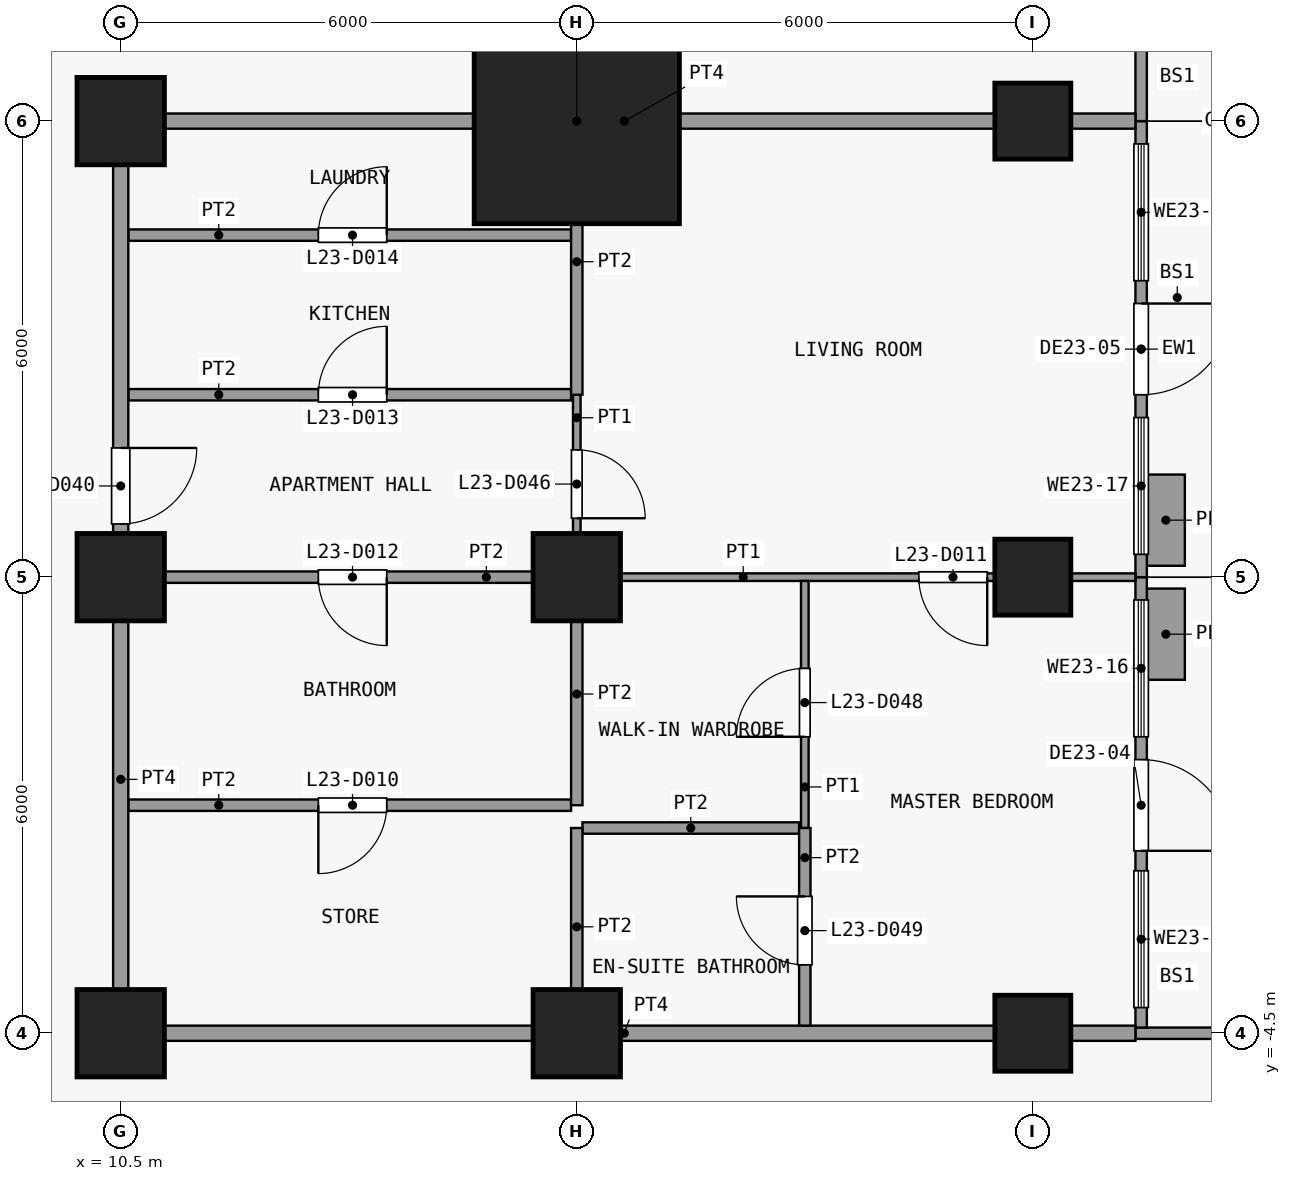
"""IFC4 building model, lengths in metres.
Left out: names, types, materials, properties, quantities, classifications, styles, units other than length and angle.
Written with IfcOpenShell. Run it as: python <this file> out.ifc"""

import sys

from ifc_helpers import new_model, si_unit, direction, frame, frame_2d, origin, origin_2d, place, context, subcontext, project, spatial, rectangle, extrude, element, fill, save


model = new_model("IFC4")
c1 = context("Model", 3, precision=1e-05, world=origin(), true_north=direction((0.0, 1.0)))
c2 = subcontext(c1, "Body", "Model", "MODEL_VIEW")
j1 = project(units=[si_unit("LENGTHUNIT", "METRE"), si_unit("PLANEANGLEUNIT", "RADIAN")], contexts=[c1])
p1 = place(None, origin())
s1 = spatial("IfcSite", under=j1, at=p1, CompositionType="ELEMENT")
p2 = place(p1, origin())
s2 = spatial("IfcBuilding", under=s1, at=p2, CompositionType="ELEMENT")
p3 = place(p2, frame((0.0, 0.0, 95.5)))
s3 = spatial("IfcBuildingStorey", under=s2, at=p3, CompositionType="ELEMENT", Elevation=95.5)
for number, where, z_axis, x_axis in (
    (1, (10.5, -4.5, 0.0), (0.0, 0.0, 1.0), (1.0, 0.0, 0.0)),
    (2, (10.5, 1.5, 0.0), (0.0, 0.0, 1.0), (1.0, 0.0, 0.0)),
    (3, (10.5, 7.5, 0.0), (0.0, 0.0, 1.0), (1.0, 0.0, 0.0)),
    (4, (16.5, -4.5, 0.0), (0.0, 0.0, 1.0), (1.0, 0.0, 0.0)),
    (5, (16.5, 1.5, 0.0), (0.0, 0.0, 1.0), (1.0, 0.0, 0.0)),
):
    element("IfcColumn", number, at=place(p3, frame(where, z_axis=z_axis, x_axis=x_axis)), inside=s3, PredefinedType="COLUMN", context=c2, shape_type="SweptSolid", body=[
        extrude(rectangle(XDim=1.15, YDim=1.15, at=origin_2d()), origin(), (0.0, 0.0, 1.0), 3.6),
    ])
p4 = place(p3, frame((16.5, 7.5, 0.0), z_axis=(0.0, 0.0, 1.0), x_axis=(1.0, 0.0, 0.0)))
e6 = element("IfcColumn", 6, at=p4, inside=s3, PredefinedType="COLUMN", context=c2, shape_type="SweptSolid", body=[
    extrude(rectangle(XDim=2.7, YDim=2.7, at=origin_2d()), origin(), (0.0, 0.0, 1.0), 3.6),
])
for number, where, z_axis, x_axis in (
    (7, (22.5, -4.5, 0.0), (0.0, 0.0, 1.0), (1.0, 0.0, 0.0)),
    (8, (22.5, 1.5, 0.0), (0.0, 0.0, 1.0), (1.0, 0.0, 0.0)),
    (9, (22.5, 7.5, 0.0), (0.0, 0.0, 1.0), (1.0, 0.0, 0.0)),
):
    element("IfcColumn", number, at=place(p3, frame(where, z_axis=z_axis, x_axis=x_axis)), inside=s3, PredefinedType="COLUMN", context=c2, shape_type="SweptSolid", body=[
        extrude(rectangle(XDim=1.0, YDim=1.0, at=origin_2d()), origin(), (0.0, 0.0, 1.0), 3.6),
    ])
p5 = place(p3, frame((23.85, -4.5, 0.0), z_axis=(0.0, 0.0, 1.0), x_axis=(1.0, 0.0, 0.0)))
e10 = element("IfcWall", 10, at=p5, inside=s3, PredefinedType="SOLIDWALL", context=c2, shape_type="SweptSolid", body=[
    extrude(rectangle(XDim=2.55, YDim=0.15, at=frame_2d((1.275, 0.0))), origin(), (0.0, 0.0, 1.0), 3.3),
])
p6 = place(p3, frame((23.925, 1.5, 0.0), z_axis=(0.0, 0.0, 1.0), x_axis=(0.0, -1.0, 0.0)))
e11 = element("IfcWall", 11, at=p6, inside=s3, PredefinedType="SOLIDWALL", context=c2, shape_type="SweptSolid", body=[
    extrude(rectangle(XDim=5.925, YDim=0.15, at=frame_2d((2.962, 0.0))), origin(), (0.0, 0.0, 1.0), 3.3),
])
p7 = place(p6, frame((2.4, 0.0, 0.0)))
e12 = element("IfcOpeningElement", 12, at=p7, cuts=e11, PredefinedType="OPENING", context=c2, shape_type="SweptSolid", body=[
    extrude(rectangle(XDim=1.2, YDim=2.4, at=frame_2d((0.6, 1.2))), frame((0.0, 0.085, 0.0), z_axis=(0.0, -1.0, 0.0), x_axis=(1.0, 0.0, 0.0)), (0.0, 0.0, 1.0), 0.17),
])
p8 = place(p6, frame((3.863, 0.0, 0.9)))
e13 = element("IfcOpeningElement", 13, at=p8, cuts=e11, PredefinedType="OPENING", context=c2, shape_type="SweptSolid", body=[
    extrude(rectangle(XDim=1.8, YDim=2.1, at=frame_2d((0.9, 1.05))), frame((0.0, 0.085, 0.0), z_axis=(0.0, -1.0, 0.0), x_axis=(1.0, 0.0, 0.0)), (0.0, 0.0, 1.0), 0.17),
])
p9 = place(p6, frame((0.3, 0.0, 0.9)))
e14 = element("IfcOpeningElement", 14, at=p9, cuts=e11, PredefinedType="OPENING", context=c2, shape_type="SweptSolid", body=[
    extrude(rectangle(XDim=1.8, YDim=2.1, at=frame_2d((0.9, 1.05))), frame((0.0, 0.085, 0.0), z_axis=(0.0, -1.0, 0.0), x_axis=(1.0, 0.0, 0.0)), (0.0, 0.0, 1.0), 0.17),
])
p10 = place(p3, frame((24.25, 0.15, 0.0), z_axis=(0.0, 0.0, 1.0), x_axis=(0.0, 1.0, 0.0)))
e15 = element("IfcWall", 15, at=p10, inside=s3, PredefinedType="USERDEFINED", context=c2, shape_type="SweptSolid", body=[
    extrude(rectangle(XDim=1.2, YDim=0.5, at=frame_2d((0.6, 0.0))), origin(), (0.0, 0.0, 1.0), 0.9),
])
p11 = place(p3, frame((23.925, 7.5, 0.0), z_axis=(0.0, 0.0, 1.0), x_axis=(0.0, -1.0, 0.0)))
e16 = element("IfcWall", 16, at=p11, inside=s3, PredefinedType="SOLIDWALL", context=c2, shape_type="SweptSolid", body=[
    extrude(rectangle(XDim=6.0, YDim=0.15, at=frame_2d((3.0, 0.0))), origin(), (0.0, 0.0, 1.0), 3.3),
])
p12 = place(p11, frame((2.4, 0.0, 0.0)))
e17 = element("IfcOpeningElement", 17, at=p12, cuts=e16, PredefinedType="OPENING", context=c2, shape_type="SweptSolid", body=[
    extrude(rectangle(XDim=1.2, YDim=2.4, at=frame_2d((0.6, 1.2))), frame((0.0, 0.085, 0.0), z_axis=(0.0, -1.0, 0.0), x_axis=(1.0, 0.0, 0.0)), (0.0, 0.0, 1.0), 0.17),
])
p13 = place(p11, frame((3.9, 0.0, 0.9)))
e18 = element("IfcOpeningElement", 18, at=p13, cuts=e16, PredefinedType="OPENING", context=c2, shape_type="SweptSolid", body=[
    extrude(rectangle(XDim=1.8, YDim=2.1, at=frame_2d((0.9, 1.05))), frame((0.0, 0.085, 0.0), z_axis=(0.0, -1.0, 0.0), x_axis=(1.0, 0.0, 0.0)), (0.0, 0.0, 1.0), 0.17),
])
p14 = place(p11, frame((0.3, 0.0, 0.9)))
e19 = element("IfcOpeningElement", 19, at=p14, cuts=e16, PredefinedType="OPENING", context=c2, shape_type="SweptSolid", body=[
    extrude(rectangle(XDim=1.8, YDim=2.1, at=frame_2d((0.9, 1.05))), frame((0.0, 0.085, 0.0), z_axis=(0.0, -1.0, 0.0), x_axis=(1.0, 0.0, 0.0)), (0.0, 0.0, 1.0), 0.17),
])
p15 = place(p3, frame((24.25, 1.65, 0.0), z_axis=(0.0, 0.0, 1.0), x_axis=(0.0, 1.0, 0.0)))
e20 = element("IfcWall", 20, at=p15, inside=s3, PredefinedType="USERDEFINED", context=c2, shape_type="SweptSolid", body=[
    extrude(rectangle(XDim=1.2, YDim=0.5, at=frame_2d((0.6, 0.0))), origin(), (0.0, 0.0, 1.0), 0.9),
])
p16 = place(p3, frame((23.925, 13.425, 0.0), z_axis=(0.0, 0.0, 1.0), x_axis=(0.0, -1.0, 0.0)))
e21 = element("IfcWall", 21, at=p16, inside=s3, PredefinedType="SOLIDWALL", context=c2, shape_type="SweptSolid", body=[
    extrude(rectangle(XDim=5.925, YDim=0.15, at=frame_2d((2.962, 0.0))), origin(), (0.0, 0.0, 1.0), 3.3),
])
p17 = place(p16, frame((0.825, 0.0, 0.0)))
e22 = element("IfcOpeningElement", 22, at=p17, cuts=e21, PredefinedType="OPENING", context=c2, shape_type="SweptSolid", body=[
    extrude(rectangle(XDim=1.2, YDim=2.4, at=frame_2d((0.6, 1.2))), frame((0.0, 0.085, 0.0), z_axis=(0.0, -1.0, 0.0), x_axis=(1.0, 0.0, 0.0)), (0.0, 0.0, 1.0), 0.17),
])
p18 = place(p16, frame((3.075, 0.0, 0.9)))
e23 = element("IfcOpeningElement", 23, at=p18, cuts=e21, PredefinedType="OPENING", context=c2, shape_type="SweptSolid", body=[
    extrude(rectangle(XDim=1.8, YDim=2.1, at=frame_2d((0.9, 1.05))), frame((0.0, 0.085, 0.0), z_axis=(0.0, -1.0, 0.0), x_axis=(1.0, 0.0, 0.0)), (0.0, 0.0, 1.0), 0.17),
])
p19 = place(p3, frame((10.4, -4.5, 0.0), z_axis=(0.0, 0.0, 1.0), x_axis=(1.0, 0.0, 0.0)))
e24 = element("IfcWall", 24, at=p19, inside=s3, PredefinedType="PARTITIONING", context=c2, shape_type="SweptSolid", body=[
    extrude(rectangle(XDim=13.45, YDim=0.2, at=frame_2d((6.725, 0.0))), origin(), (0.0, 0.0, 1.0), 3.3),
])
p20 = place(p3, frame((16.575, -1.8, 0.0), z_axis=(0.0, 0.0, 1.0), x_axis=(1.0, 0.0, 0.0)))
e25 = element("IfcWall", 25, at=p20, inside=s3, PredefinedType="PARTITIONING", context=c2, shape_type="SweptSolid", body=[
    extrude(rectangle(XDim=2.85, YDim=0.15, at=frame_2d((1.425, 0.0))), origin(), (0.0, 0.0, 1.0), 3.3),
])
p21 = place(p3, frame((10.6, -1.5, 0.0), z_axis=(0.0, 0.0, 1.0), x_axis=(1.0, 0.0, 0.0)))
e26 = element("IfcWall", 26, at=p21, inside=s3, PredefinedType="PARTITIONING", context=c2, shape_type="SweptSolid", body=[
    extrude(rectangle(XDim=5.825, YDim=0.15, at=frame_2d((2.913, 0.0))), origin(), (0.0, 0.0, 1.0), 3.3),
])
p22 = place(p21, frame((2.5, 0.0, 0.0)))
e27 = element("IfcOpeningElement", 27, at=p22, cuts=e26, PredefinedType="OPENING", context=c2, shape_type="SweptSolid", body=[
    extrude(rectangle(XDim=0.9, YDim=2.1, at=frame_2d((0.45, 1.05))), frame((0.0, 0.085, 0.0), z_axis=(0.0, -1.0, 0.0), x_axis=(1.0, 0.0, 0.0)), (0.0, 0.0, 1.0), 0.17),
])
p23 = place(p3, frame((16.5, 1.5, 0.0), z_axis=(0.0, 0.0, 1.0), x_axis=(1.0, 0.0, 0.0)))
e28 = element("IfcWall", 28, at=p23, inside=s3, PredefinedType="PARTITIONING", context=c2, shape_type="SweptSolid", body=[
    extrude(rectangle(XDim=7.35, YDim=0.1, at=frame_2d((3.675, 0.0))), origin(), (0.0, 0.0, 1.0), 3.3),
])
p24 = place(p23, frame((4.5, 0.0, 0.0)))
e29 = element("IfcOpeningElement", 29, at=p24, cuts=e28, PredefinedType="OPENING", context=c2, shape_type="SweptSolid", body=[
    extrude(rectangle(XDim=0.9, YDim=2.1, at=frame_2d((0.45, 1.05))), frame((0.0, 0.06, 0.0), z_axis=(0.0, -1.0, 0.0), x_axis=(1.0, 0.0, 0.0)), (0.0, 0.0, 1.0), 0.12),
])
p25 = place(p3, frame((10.6, 1.5, 0.0), z_axis=(0.0, 0.0, 1.0), x_axis=(1.0, 0.0, 0.0)))
e30 = element("IfcWall", 30, at=p25, inside=s3, PredefinedType="PARTITIONING", context=c2, shape_type="SweptSolid", body=[
    extrude(rectangle(XDim=5.9, YDim=0.15, at=frame_2d((2.95, 0.0))), origin(), (0.0, 0.0, 1.0), 3.3),
])
p26 = place(p25, frame((2.5, 0.0, 0.0)))
e31 = element("IfcOpeningElement", 31, at=p26, cuts=e30, PredefinedType="OPENING", context=c2, shape_type="SweptSolid", body=[
    extrude(rectangle(XDim=0.9, YDim=2.1, at=frame_2d((0.45, 1.05))), frame((0.0, 0.085, 0.0), z_axis=(0.0, -1.0, 0.0), x_axis=(1.0, 0.0, 0.0)), (0.0, 0.0, 1.0), 0.17),
])
p27 = place(p3, frame((10.6, 3.9, 0.0), z_axis=(0.0, 0.0, 1.0), x_axis=(1.0, 0.0, 0.0)))
e32 = element("IfcWall", 32, at=p27, inside=s3, PredefinedType="PARTITIONING", context=c2, shape_type="SweptSolid", body=[
    extrude(rectangle(XDim=5.825, YDim=0.15, at=frame_2d((2.913, 0.0))), origin(), (0.0, 0.0, 1.0), 3.3),
])
p28 = place(p27, frame((2.5, 0.0, 0.0)))
e33 = element("IfcOpeningElement", 33, at=p28, cuts=e32, PredefinedType="OPENING", context=c2, shape_type="SweptSolid", body=[
    extrude(rectangle(XDim=0.9, YDim=2.1, at=frame_2d((0.45, 1.05))), frame((0.0, 0.085, 0.0), z_axis=(0.0, -1.0, 0.0), x_axis=(1.0, 0.0, 0.0)), (0.0, 0.0, 1.0), 0.17),
])
p29 = place(p3, frame((10.6, 6.0, 0.0), z_axis=(0.0, 0.0, 1.0), x_axis=(1.0, 0.0, 0.0)))
e34 = element("IfcWall", 34, at=p29, inside=s3, PredefinedType="PARTITIONING", context=c2, shape_type="SweptSolid", body=[
    extrude(rectangle(XDim=5.825, YDim=0.15, at=frame_2d((2.913, 0.0))), origin(), (0.0, 0.0, 1.0), 3.3),
])
p30 = place(p29, frame((2.5, 0.0, 0.0)))
e35 = element("IfcOpeningElement", 35, at=p30, cuts=e34, PredefinedType="OPENING", context=c2, shape_type="SweptSolid", body=[
    extrude(rectangle(XDim=0.9, YDim=2.1, at=frame_2d((0.45, 1.05))), frame((0.0, 0.085, 0.0), z_axis=(0.0, -1.0, 0.0), x_axis=(1.0, 0.0, 0.0)), (0.0, 0.0, 1.0), 0.17),
])
p31 = place(p3, frame((10.4, 7.5, 0.0), z_axis=(0.0, 0.0, 1.0), x_axis=(1.0, 0.0, 0.0)))
e36 = element("IfcWall", 36, at=p31, inside=s3, PredefinedType="PARTITIONING", context=c2, shape_type="SweptSolid", body=[
    extrude(rectangle(XDim=13.45, YDim=0.2, at=frame_2d((6.725, 0.0))), origin(), (0.0, 0.0, 1.0), 3.3),
])
p32 = place(p3, frame((10.5, -4.4, 0.0), z_axis=(0.0, 0.0, 1.0), x_axis=(0.0, 1.0, 0.0)))
e37 = element("IfcWall", 37, at=p32, inside=s3, PredefinedType="PARTITIONING", context=c2, shape_type="SweptSolid", body=[
    extrude(rectangle(XDim=11.8, YDim=0.2, at=frame_2d((5.9, 0.0))), origin(), (0.0, 0.0, 1.0), 3.3),
])
p33 = place(p32, frame((6.6, 0.0, 0.0)))
e38 = element("IfcOpeningElement", 38, at=p33, cuts=e37, PredefinedType="OPENING", context=c2, shape_type="SweptSolid", body=[
    extrude(rectangle(XDim=1.0, YDim=2.1, at=frame_2d((0.5, 1.05))), frame((0.0, 0.11, 0.0), z_axis=(0.0, -1.0, 0.0), x_axis=(1.0, 0.0, 0.0)), (0.0, 0.0, 1.0), 0.22),
])
p34 = place(p3, frame((16.5, 1.575, 0.0), z_axis=(0.0, 0.0, 1.0), x_axis=(0.0, 1.0, 0.0)))
e39 = element("IfcWall", 39, at=p34, inside=s3, PredefinedType="PARTITIONING", context=c2, shape_type="SweptSolid", body=[
    extrude(rectangle(XDim=2.325, YDim=0.1, at=frame_2d((1.163, 0.0))), origin(), (0.0, 0.0, 1.0), 3.3),
])
p35 = place(p34, frame((0.7, 0.0, 0.0)))
e40 = element("IfcOpeningElement", 40, at=p35, cuts=e39, PredefinedType="OPENING", context=c2, shape_type="SweptSolid", body=[
    extrude(rectangle(XDim=0.9, YDim=2.1, at=frame_2d((0.45, 1.05))), frame((0.0, 0.06, 0.0), z_axis=(0.0, -1.0, 0.0), x_axis=(1.0, 0.0, 0.0)), (0.0, 0.0, 1.0), 0.12),
])
p36 = place(p3, frame((16.5, -4.4, 0.0), z_axis=(0.0, 0.0, 1.0), x_axis=(0.0, 1.0, 0.0)))
e41 = element("IfcWall", 41, at=p36, inside=s3, PredefinedType="PARTITIONING", context=c2, shape_type="SweptSolid", body=[
    extrude(rectangle(XDim=2.6, YDim=0.15, at=frame_2d((1.3, 0.0))), origin(), (0.0, 0.0, 1.0), 3.3),
])
p37 = place(p3, frame((16.5, -1.5, 0.0), z_axis=(0.0, 0.0, 1.0), x_axis=(0.0, 1.0, 0.0)))
e42 = element("IfcWall", 42, at=p37, inside=s3, PredefinedType="PARTITIONING", context=c2, shape_type="SweptSolid", body=[
    extrude(rectangle(XDim=2.925, YDim=0.15, at=frame_2d((1.462, 0.0))), origin(), (0.0, 0.0, 1.0), 3.3),
])
p38 = place(p3, frame((16.5, 3.9, 0.0), z_axis=(0.0, 0.0, 1.0), x_axis=(0.0, 1.0, 0.0)))
e43 = element("IfcWall", 43, at=p38, inside=s3, PredefinedType="PARTITIONING", context=c2, shape_type="SweptSolid", body=[
    extrude(rectangle(XDim=3.5, YDim=0.15, at=frame_2d((1.75, 0.0))), origin(), (0.0, 0.0, 1.0), 3.3),
])
p39 = place(p3, frame((19.5, -1.8, 0.0), z_axis=(0.0, 0.0, 1.0), x_axis=(0.0, 1.0, 0.0)))
e44 = element("IfcWall", 44, at=p39, inside=s3, PredefinedType="PARTITIONING", context=c2, shape_type="SweptSolid", body=[
    extrude(rectangle(XDim=3.25, YDim=0.1, at=frame_2d((1.625, 0.0))), origin(), (0.0, 0.0, 1.0), 3.3),
])
p40 = place(p39, frame((1.2, 0.0, 0.0)))
e45 = element("IfcOpeningElement", 45, at=p40, cuts=e44, PredefinedType="OPENING", context=c2, shape_type="SweptSolid", body=[
    extrude(rectangle(XDim=0.9, YDim=2.1, at=frame_2d((0.45, 1.05))), frame((0.0, 0.06, 0.0), z_axis=(0.0, -1.0, 0.0), x_axis=(1.0, 0.0, 0.0)), (0.0, 0.0, 1.0), 0.12),
])
p41 = place(p3, frame((19.5, -4.4, 0.0), z_axis=(0.0, 0.0, 1.0), x_axis=(0.0, 1.0, 0.0)))
e46 = element("IfcWall", 46, at=p41, inside=s3, PredefinedType="PARTITIONING", context=c2, shape_type="SweptSolid", body=[
    extrude(rectangle(XDim=2.6, YDim=0.15, at=frame_2d((1.3, 0.0))), origin(), (0.0, 0.0, 1.0), 3.3),
])
p42 = place(p41, frame((0.8, 0.0, 0.0)))
e47 = element("IfcOpeningElement", 47, at=p42, cuts=e46, PredefinedType="OPENING", context=c2, shape_type="SweptSolid", body=[
    extrude(rectangle(XDim=0.9, YDim=2.1, at=frame_2d((0.45, 1.05))), frame((0.0, 0.085, 0.0), z_axis=(0.0, -1.0, 0.0), x_axis=(1.0, 0.0, 0.0)), (0.0, 0.0, 1.0), 0.17),
])
p43 = place(p7, origin())
e48 = element("IfcDoor", 48, at=p43, inside=s3, OperationType="SINGLE_SWING_RIGHT", PredefinedType="DOOR", context=c2, shape_type="SweptSolid", body=[
    extrude(rectangle(XDim=1.2, YDim=2.4, at=frame_2d((0.6, 1.2))), frame((0.0, 0.025, 0.0), z_axis=(0.0, -1.0, 0.0), x_axis=(1.0, 0.0, 0.0)), (0.0, 0.0, 1.0), 0.05),
])
fill(e12, e48)
p44 = place(p8, origin())
e49 = element("IfcWindow", 49, at=p44, inside=s3, PartitioningType="SINGLE_PANEL", PredefinedType="WINDOW", context=c2, shape_type="SweptSolid", body=[
    extrude(rectangle(XDim=1.8, YDim=2.1, at=frame_2d((0.9, 1.05))), frame((0.0, 0.03, 0.0), z_axis=(0.0, -1.0, 0.0), x_axis=(1.0, 0.0, 0.0)), (0.0, 0.0, 1.0), 0.06),
])
fill(e13, e49)
p45 = place(p9, origin())
e50 = element("IfcWindow", 50, at=p45, inside=s3, PartitioningType="SINGLE_PANEL", PredefinedType="WINDOW", context=c2, shape_type="SweptSolid", body=[
    extrude(rectangle(XDim=1.8, YDim=2.1, at=frame_2d((0.9, 1.05))), frame((0.0, 0.03, 0.0), z_axis=(0.0, -1.0, 0.0), x_axis=(1.0, 0.0, 0.0)), (0.0, 0.0, 1.0), 0.06),
])
fill(e14, e50)
p46 = place(p12, origin())
e51 = element("IfcDoor", 51, at=p46, inside=s3, OperationType="SINGLE_SWING_LEFT", PredefinedType="DOOR", context=c2, shape_type="SweptSolid", body=[
    extrude(rectangle(XDim=1.2, YDim=2.4, at=frame_2d((0.6, 1.2))), frame((0.0, 0.025, 0.0), z_axis=(0.0, -1.0, 0.0), x_axis=(1.0, 0.0, 0.0)), (0.0, 0.0, 1.0), 0.05),
])
fill(e17, e51)
p47 = place(p13, origin())
e52 = element("IfcWindow", 52, at=p47, inside=s3, PartitioningType="SINGLE_PANEL", PredefinedType="WINDOW", context=c2, shape_type="SweptSolid", body=[
    extrude(rectangle(XDim=1.8, YDim=2.1, at=frame_2d((0.9, 1.05))), frame((0.0, 0.03, 0.0), z_axis=(0.0, -1.0, 0.0), x_axis=(1.0, 0.0, 0.0)), (0.0, 0.0, 1.0), 0.06),
])
fill(e18, e52)
p48 = place(p14, origin())
e53 = element("IfcWindow", 53, at=p48, inside=s3, PartitioningType="SINGLE_PANEL", PredefinedType="WINDOW", context=c2, shape_type="SweptSolid", body=[
    extrude(rectangle(XDim=1.8, YDim=2.1, at=frame_2d((0.9, 1.05))), frame((0.0, 0.03, 0.0), z_axis=(0.0, -1.0, 0.0), x_axis=(1.0, 0.0, 0.0)), (0.0, 0.0, 1.0), 0.06),
])
fill(e19, e53)
p49 = place(p22, origin())
e54 = element("IfcDoor", 54, at=p49, inside=s3, OperationType="SINGLE_SWING_LEFT", PredefinedType="DOOR", context=c2, shape_type="SweptSolid", body=[
    extrude(rectangle(XDim=0.9, YDim=2.1, at=frame_2d((0.45, 1.05))), frame((0.0, 0.025, 0.0), z_axis=(0.0, -1.0, 0.0), x_axis=(1.0, 0.0, 0.0)), (0.0, 0.0, 1.0), 0.05),
])
fill(e27, e54)
p50 = place(p24, origin())
e55 = element("IfcDoor", 55, at=p50, inside=s3, OperationType="SINGLE_SWING_RIGHT", PredefinedType="DOOR", context=c2, shape_type="SweptSolid", body=[
    extrude(rectangle(XDim=0.9, YDim=2.1, at=frame_2d((0.45, 1.05))), frame((0.0, 0.025, 0.0), z_axis=(0.0, -1.0, 0.0), x_axis=(1.0, 0.0, 0.0)), (0.0, 0.0, 1.0), 0.05),
])
fill(e29, e55)
p51 = place(p26, origin())
e56 = element("IfcDoor", 56, at=p51, inside=s3, OperationType="SINGLE_SWING_RIGHT", PredefinedType="DOOR", context=c2, shape_type="SweptSolid", body=[
    extrude(rectangle(XDim=0.9, YDim=2.1, at=frame_2d((0.45, 1.05))), frame((0.0, 0.025, 0.0), z_axis=(0.0, -1.0, 0.0), x_axis=(1.0, 0.0, 0.0)), (0.0, 0.0, 1.0), 0.05),
])
fill(e31, e56)
p52 = place(p28, origin())
e57 = element("IfcDoor", 57, at=p52, inside=s3, OperationType="SINGLE_SWING_LEFT", PredefinedType="DOOR", context=c2, shape_type="SweptSolid", body=[
    extrude(rectangle(XDim=0.9, YDim=2.1, at=frame_2d((0.45, 1.05))), frame((0.0, 0.025, 0.0), z_axis=(0.0, -1.0, 0.0), x_axis=(1.0, 0.0, 0.0)), (0.0, 0.0, 1.0), 0.05),
])
fill(e33, e57)
p53 = place(p30, origin())
e58 = element("IfcDoor", 58, at=p53, inside=s3, OperationType="SINGLE_SWING_LEFT", PredefinedType="DOOR", context=c2, shape_type="SweptSolid", body=[
    extrude(rectangle(XDim=0.9, YDim=2.1, at=frame_2d((0.45, 1.05))), frame((0.0, 0.025, 0.0), z_axis=(0.0, -1.0, 0.0), x_axis=(1.0, 0.0, 0.0)), (0.0, 0.0, 1.0), 0.05),
])
fill(e35, e58)
p54 = place(p33, origin())
e59 = element("IfcDoor", 59, at=p54, inside=s3, OperationType="SINGLE_SWING_RIGHT", PredefinedType="DOOR", context=c2, shape_type="SweptSolid", body=[
    extrude(rectangle(XDim=1.0, YDim=2.1, at=frame_2d((0.5, 1.05))), frame((0.0, 0.025, 0.0), z_axis=(0.0, -1.0, 0.0), x_axis=(1.0, 0.0, 0.0)), (0.0, 0.0, 1.0), 0.05),
])
fill(e38, e59)
p55 = place(p35, origin())
e60 = element("IfcDoor", 60, at=p55, inside=s3, OperationType="SINGLE_SWING_LEFT", PredefinedType="DOOR", context=c2, shape_type="SweptSolid", body=[
    extrude(rectangle(XDim=0.9, YDim=2.1, at=frame_2d((0.45, 1.05))), frame((0.0, 0.025, 0.0), z_axis=(0.0, -1.0, 0.0), x_axis=(1.0, 0.0, 0.0)), (0.0, 0.0, 1.0), 0.05),
])
fill(e40, e60)
p56 = place(p40, origin())
e61 = element("IfcDoor", 61, at=p56, inside=s3, OperationType="SINGLE_SWING_RIGHT", PredefinedType="DOOR", context=c2, shape_type="SweptSolid", body=[
    extrude(rectangle(XDim=0.9, YDim=2.1, at=frame_2d((0.45, 1.05))), frame((0.0, 0.025, 0.0), z_axis=(0.0, -1.0, 0.0), x_axis=(1.0, 0.0, 0.0)), (0.0, 0.0, 1.0), 0.05),
])
fill(e45, e61)
p57 = place(p42, origin())
e62 = element("IfcDoor", 62, at=p57, inside=s3, OperationType="SINGLE_SWING_LEFT", PredefinedType="DOOR", context=c2, shape_type="SweptSolid", body=[
    extrude(rectangle(XDim=0.9, YDim=2.1, at=frame_2d((0.45, 1.05))), frame((0.0, 0.025, 0.0), z_axis=(0.0, -1.0, 0.0), x_axis=(1.0, 0.0, 0.0)), (0.0, 0.0, 1.0), 0.05),
])
fill(e47, e62)
save(model, sys.argv[1])
